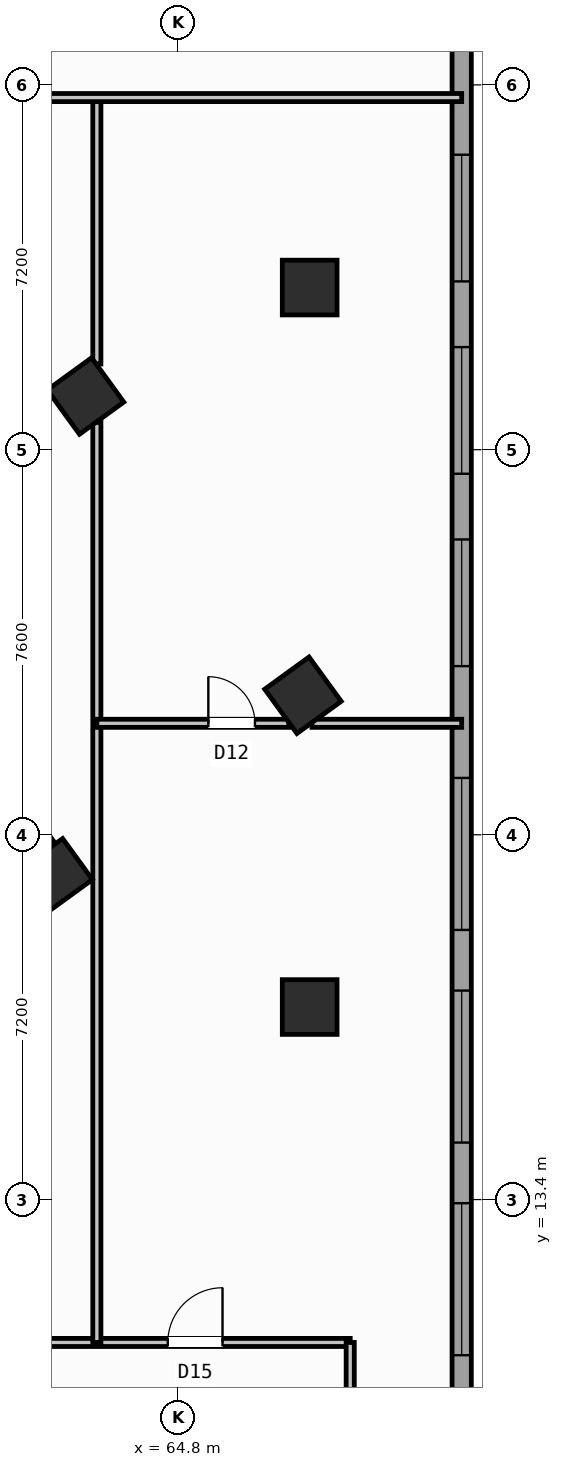
"""IFC4 building model, lengths in metres.
Left out: names, types, materials, properties, quantities, classifications, styles, units other than length and angle.
Written with IfcOpenShell. Run it as: python <this file> out.ifc"""

import sys

from ifc_helpers import new_model, si_unit, direction, frame, frame_2d, origin, origin_2d, place, context, subcontext, project, spatial, rectangle, hollow_rectangle, extrude, source, transform, mapped, element, fill, save


model = new_model("IFC4")
c1 = context("Model", 3, precision=1e-05, world=origin(), true_north=direction((0.0, 1.0)))
c2 = subcontext(c1, "Body", "Model", "MODEL_VIEW")
j1 = project(units=[si_unit("LENGTHUNIT", "METRE"), si_unit("PLANEANGLEUNIT", "RADIAN")], contexts=[c1])
p1 = place(None, origin())
s1 = spatial("IfcSite", under=j1, at=p1, CompositionType="ELEMENT")
p2 = place(p1, origin())
s2 = spatial("IfcBuilding", under=s1, at=p2, CompositionType="ELEMENT")
p3 = place(p2, frame((0.0, 0.0, 5.4)))
s3 = spatial("IfcBuildingStorey", under=s2, at=p3, CompositionType="ELEMENT", Elevation=5.4)
p4 = place(p3, frame((52.318, 13.11, 0.0), z_axis=(0.0, 0.0, 1.0), x_axis=(0.809019445368, 0.587781878776, 0.0)))
e1 = element("IfcWall", 1, at=p4, inside=s3, PredefinedType="SHEAR", context=c2, shape_type="SweptSolid", body=[
    extrude(rectangle(XDim=12.44, YDim=0.65, at=frame_2d((6.22, 0.0))), origin(), (0.0, 0.0, 1.0), 4.45),
])
m1 = source(origin(), c2, "Body", "SweptSolid", [
    extrude(hollow_rectangle(XDim=1.08, YDim=1.08, WallThickness=0.04, at=origin_2d()), origin(), (0.0, 0.0, 1.0), 4.8),
])
for number, where, z_axis, x_axis in (
    (2, (67.4, 17.2, 0.0), (0.0, 0.0, 1.0), (1.0, 0.0, 0.0)),
    (3, (67.4, 31.4, 0.0), (0.0, 0.0, 1.0), (1.0, 0.0, 0.0)),
    (4, (67.268, 23.354, 0.0), (0.0, 0.0, 1.0), (0.809, 0.588, 0.0)),
    (5, (62.977, 29.259, 0.0), (0.0, 0.0, 1.0), (0.809, 0.588, 0.0)),
):
    element("IfcColumn", number, at=place(p3, frame(where, z_axis=z_axis, x_axis=x_axis)), inside=s3, PredefinedType="COLUMN", context=c2, shape_type="MappedRepresentation", body=[
        mapped(m1, transform((0.0, 0.0, 0.0), scale=1.0)),
    ])
m2 = source(origin(), c2, "Body", "SweptSolid", [
    extrude(hollow_rectangle(XDim=1.0, YDim=1.0, WallThickness=0.04, at=origin_2d()), origin(), (0.0, 0.0, 1.0), 4.8),
])
p5 = place(p3, frame((62.414, 19.827, 0.0), z_axis=(0.0, 0.0, 1.0), x_axis=(0.809016994375, 0.587785252292, 0.0)))
e6 = element("IfcColumn", 6, at=p5, inside=s3, PredefinedType="COLUMN", context=c2, shape_type="MappedRepresentation", body=[
    mapped(m2, transform((0.0, 0.0, 0.0), scale=1.0)),
])
p6 = place(p3, frame((70.4, 43.117, 0.0), z_axis=(0.0, 0.0, 1.0), x_axis=(0.0, -1.0, 0.0)))
e7 = element("IfcWall", 7, at=p6, inside=s3, PredefinedType="STANDARD", context=c2, shape_type="SweptSolid", body=[
    extrude(rectangle(XDim=38.234, YDim=0.38, at=frame_2d((19.117, 0.0))), origin(), (0.0, 0.0, 1.0), 4.45),
])
p7 = place(p6, frame((2.569, 0.0, 0.7)))
e8 = element("IfcOpeningElement", 8, at=p7, cuts=e7, PredefinedType="OPENING", context=c2, shape_type="SweptSolid", body=[
    extrude(rectangle(XDim=3.0, YDim=2.3, at=frame_2d((1.5, 1.15))), frame((0.0, 0.2, 0.0), z_axis=(0.0, -1.0, 0.0), x_axis=(1.0, 0.0, 0.0)), (0.0, 0.0, 1.0), 0.4),
])
p8 = place(p6, frame((9.095, 0.0, 0.9)))
e9 = element("IfcOpeningElement", 9, at=p8, cuts=e7, PredefinedType="OPENING", context=c2, shape_type="SweptSolid", body=[
    extrude(rectangle(XDim=2.5, YDim=1.9, at=frame_2d((1.25, 0.95))), frame((0.0, 0.2, 0.0), z_axis=(0.0, -1.0, 0.0), x_axis=(1.0, 0.0, 0.0)), (0.0, 0.0, 1.0), 0.4),
])
p9 = place(p6, frame((12.892, 0.0, 0.9)))
e10 = element("IfcOpeningElement", 10, at=p9, cuts=e7, PredefinedType="OPENING", context=c2, shape_type="SweptSolid", body=[
    extrude(rectangle(XDim=2.5, YDim=1.9, at=frame_2d((1.25, 0.95))), frame((0.0, 0.2, 0.0), z_axis=(0.0, -1.0, 0.0), x_axis=(1.0, 0.0, 0.0)), (0.0, 0.0, 1.0), 0.4),
])
p10 = place(p6, frame((16.689, 0.0, 0.9)))
e11 = element("IfcOpeningElement", 11, at=p10, cuts=e7, PredefinedType="OPENING", context=c2, shape_type="SweptSolid", body=[
    extrude(rectangle(XDim=2.5, YDim=1.9, at=frame_2d((1.25, 0.95))), frame((0.0, 0.2, 0.0), z_axis=(0.0, -1.0, 0.0), x_axis=(1.0, 0.0, 0.0)), (0.0, 0.0, 1.0), 0.4),
])
p11 = place(p6, frame((21.396, 0.0, 0.7)))
e12 = element("IfcOpeningElement", 12, at=p11, cuts=e7, PredefinedType="OPENING", context=c2, shape_type="SweptSolid", body=[
    extrude(rectangle(XDim=3.0, YDim=2.3, at=frame_2d((1.5, 1.15))), frame((0.0, 0.2, 0.0), z_axis=(0.0, -1.0, 0.0), x_axis=(1.0, 0.0, 0.0)), (0.0, 0.0, 1.0), 0.4),
])
p12 = place(p6, frame((25.592, 0.0, 0.7)))
e13 = element("IfcOpeningElement", 13, at=p12, cuts=e7, PredefinedType="OPENING", context=c2, shape_type="SweptSolid", body=[
    extrude(rectangle(XDim=3.0, YDim=2.3, at=frame_2d((1.5, 1.15))), frame((0.0, 0.2, 0.0), z_axis=(0.0, -1.0, 0.0), x_axis=(1.0, 0.0, 0.0)), (0.0, 0.0, 1.0), 0.4),
])
p13 = place(p6, frame((29.789, 0.0, 0.7)))
e14 = element("IfcOpeningElement", 14, at=p13, cuts=e7, PredefinedType="OPENING", context=c2, shape_type="SweptSolid", body=[
    extrude(rectangle(XDim=3.0, YDim=2.3, at=frame_2d((1.5, 1.15))), frame((0.0, 0.2, 0.0), z_axis=(0.0, -1.0, 0.0), x_axis=(1.0, 0.0, 0.0)), (0.0, 0.0, 1.0), 0.4),
])
p14 = place(p6, frame((33.986, 0.0, 0.7)))
e15 = element("IfcOpeningElement", 15, at=p14, cuts=e7, PredefinedType="OPENING", context=c2, shape_type="SweptSolid", body=[
    extrude(rectangle(XDim=3.0, YDim=2.3, at=frame_2d((1.5, 1.15))), frame((0.0, 0.2, 0.0), z_axis=(0.0, -1.0, 0.0), x_axis=(1.0, 0.0, 0.0)), (0.0, 0.0, 1.0), 0.4),
])
p15 = place(p3, frame((6.1, 10.58, 0.0), z_axis=(0.0, 0.0, 1.0), x_axis=(1.0, 0.0, 0.0)))
e16 = element("IfcWall", 16, at=p15, inside=s3, PredefinedType="PARTITIONING", context=c2, shape_type="SweptSolid", body=[
    extrude(rectangle(XDim=62.1, YDim=0.16, at=frame_2d((31.05, 0.0))), origin(), (0.0, 0.0, 1.0), 4.44),
])
p16 = place(p15, frame((29.0, 0.0, 0.0)))
e17 = element("IfcOpeningElement", 17, at=p16, cuts=e16, PredefinedType="OPENING", context=c2, shape_type="SweptSolid", body=[
    extrude(rectangle(XDim=1.7, YDim=2.2, at=frame_2d((0.85, 1.1))), frame((0.0, 0.09, 0.0), z_axis=(0.0, -1.0, 0.0), x_axis=(1.0, 0.0, 0.0)), (0.0, 0.0, 1.0), 0.18),
])
p17 = place(p15, frame((0.35, 0.0, 0.0)))
e18 = element("IfcOpeningElement", 18, at=p17, cuts=e16, PredefinedType="OPENING", context=c2, shape_type="SweptSolid", body=[
    extrude(rectangle(XDim=1.5, YDim=2.15, at=frame_2d((0.75, 1.075))), frame((0.0, 0.09, 0.0), z_axis=(0.0, -1.0, 0.0), x_axis=(1.0, 0.0, 0.0)), (0.0, 0.0, 1.0), 0.18),
])
p18 = place(p15, frame((5.2, 0.0, 0.0)))
e19 = element("IfcOpeningElement", 19, at=p18, cuts=e16, PredefinedType="OPENING", context=c2, shape_type="SweptSolid", body=[
    extrude(rectangle(XDim=1.08, YDim=2.15, at=frame_2d((0.54, 1.075))), frame((0.0, 0.09, 0.0), z_axis=(0.0, -1.0, 0.0), x_axis=(1.0, 0.0, 0.0)), (0.0, 0.0, 1.0), 0.18),
])
p19 = place(p15, frame((58.5, 0.0, 0.0)))
e20 = element("IfcOpeningElement", 20, at=p19, cuts=e16, PredefinedType="OPENING", context=c2, shape_type="SweptSolid", body=[
    extrude(rectangle(XDim=1.08, YDim=2.15, at=frame_2d((0.54, 1.075))), frame((0.0, 0.09, 0.0), z_axis=(0.0, -1.0, 0.0), x_axis=(1.0, 0.0, 0.0)), (0.0, 0.0, 1.0), 0.18),
])
p20 = place(p3, frame((63.2, 10.58, 0.0), z_axis=(0.0, 0.0, 1.0), x_axis=(0.0, 1.0, 0.0)))
e21 = element("IfcWall", 21, at=p20, inside=s3, PredefinedType="PARTITIONING", context=c2, shape_type="SweptSolid", body=[
    extrude(rectangle(XDim=18.159, YDim=0.16, at=frame_2d((9.08, 0.0))), origin(), (0.0, 0.0, 1.0), 4.44),
])
p21 = place(p3, frame((63.2, 29.891, 0.0), z_axis=(0.0, 0.0, 1.0), x_axis=(0.0, 1.0, 0.0)))
e22 = element("IfcWall", 22, at=p21, inside=s3, PredefinedType="PARTITIONING", context=c2, shape_type="SweptSolid", body=[
    extrude(rectangle(XDim=5.259, YDim=0.16, at=frame_2d((2.629, 0.0))), origin(), (0.0, 0.0, 1.0), 4.44),
])
p22 = place(p3, frame((59.379, 35.15, 0.0), z_axis=(0.0, 0.0, 1.0), x_axis=(1.0, 0.0, 0.0)))
e23 = element("IfcWall", 23, at=p22, inside=s3, PredefinedType="PARTITIONING", context=c2, shape_type="SweptSolid", body=[
    extrude(rectangle(XDim=11.021, YDim=0.16, at=frame_2d((5.51, 0.0))), origin(), (0.0, 0.0, 1.0), 4.44),
])
p23 = place(p3, frame((68.2, 7.62, 0.0), z_axis=(0.0, 0.0, 1.0), x_axis=(0.0, 1.0, 0.0)))
e24 = element("IfcWall", 24, at=p23, inside=s3, PredefinedType="PARTITIONING", context=c2, shape_type="SweptSolid", body=[
    extrude(rectangle(XDim=2.96, YDim=0.16, at=frame_2d((1.48, 0.0))), origin(), (0.0, 0.0, 1.0), 4.44),
])
p24 = place(p3, frame((63.2, 22.8, 0.0), z_axis=(0.0, 0.0, 1.0), x_axis=(1.0, 0.0, 0.0)))
e25 = element("IfcWall", 25, at=p24, inside=s3, PredefinedType="PARTITIONING", context=c2, shape_type="SweptSolid", body=[
    extrude(rectangle(XDim=3.788, YDim=0.16, at=frame_2d((1.894, 0.0))), origin(), (0.0, 0.0, 1.0), 4.44),
])
p25 = place(p24, frame((2.2, 0.0, 0.0)))
e26 = element("IfcOpeningElement", 26, at=p25, cuts=e25, PredefinedType="OPENING", context=c2, shape_type="SweptSolid", body=[
    extrude(rectangle(XDim=0.92, YDim=2.08, at=frame_2d((0.46, 1.04))), frame((0.0, 0.09, 0.0), z_axis=(0.0, -1.0, 0.0), x_axis=(1.0, 0.0, 0.0)), (0.0, 0.0, 1.0), 0.18),
])
p26 = place(p3, frame((67.445, 22.8, 0.0), z_axis=(0.0, 0.0, 1.0), x_axis=(1.0, 0.0, 0.0)))
e27 = element("IfcWall", 27, at=p26, inside=s3, PredefinedType="PARTITIONING", context=c2, shape_type="SweptSolid", body=[
    extrude(rectangle(XDim=2.955, YDim=0.16, at=frame_2d((1.478, 0.0))), origin(), (0.0, 0.0, 1.0), 4.44),
])
m3 = source(origin(), c2, "Body", "SweptSolid", [
    extrude(rectangle(XDim=2.5, YDim=1.9, at=frame_2d((1.25, 0.95))), frame((0.0, 0.03, 0.0), z_axis=(0.0, -1.0, 0.0), x_axis=(1.0, 0.0, 0.0)), (0.0, 0.0, 1.0), 0.06),
])
p27 = place(p8, origin())
e28 = element("IfcWindow", 28, at=p27, inside=s3, PartitioningType="SINGLE_PANEL", PredefinedType="WINDOW", context=c2, shape_type="MappedRepresentation", body=[
    mapped(m3, transform((0.0, 0.0, 0.0), scale=1.0)),
])
fill(e9, e28)
p28 = place(p9, origin())
e29 = element("IfcWindow", 29, at=p28, inside=s3, PartitioningType="SINGLE_PANEL", PredefinedType="WINDOW", context=c2, shape_type="MappedRepresentation", body=[
    mapped(m3, transform((0.0, 0.0, 0.0), scale=1.0)),
])
fill(e10, e29)
p29 = place(p10, origin())
e30 = element("IfcWindow", 30, at=p29, inside=s3, PartitioningType="SINGLE_PANEL", PredefinedType="WINDOW", context=c2, shape_type="MappedRepresentation", body=[
    mapped(m3, transform((0.0, 0.0, 0.0), scale=1.0)),
])
fill(e11, e30)
m4 = source(origin(), c2, "Body", "SweptSolid", [
    extrude(rectangle(XDim=3.0, YDim=2.3, at=frame_2d((1.5, 1.15))), frame((0.0, 0.03, 0.0), z_axis=(0.0, -1.0, 0.0), x_axis=(1.0, 0.0, 0.0)), (0.0, 0.0, 1.0), 0.06),
])
p30 = place(p11, origin())
e31 = element("IfcWindow", 31, at=p30, inside=s3, PartitioningType="SINGLE_PANEL", PredefinedType="WINDOW", context=c2, shape_type="MappedRepresentation", body=[
    mapped(m4, transform((0.0, 0.0, 0.0), scale=1.0)),
])
fill(e12, e31)
p31 = place(p12, origin())
e32 = element("IfcWindow", 32, at=p31, inside=s3, PartitioningType="SINGLE_PANEL", PredefinedType="WINDOW", context=c2, shape_type="MappedRepresentation", body=[
    mapped(m4, transform((0.0, 0.0, 0.0), scale=1.0)),
])
fill(e13, e32)
p32 = place(p13, origin())
e33 = element("IfcWindow", 33, at=p32, inside=s3, PartitioningType="SINGLE_PANEL", PredefinedType="WINDOW", context=c2, shape_type="MappedRepresentation", body=[
    mapped(m4, transform((0.0, 0.0, 0.0), scale=1.0)),
])
fill(e14, e33)
m5 = source(origin(), c2, "Body", "SweptSolid", [
    extrude(rectangle(XDim=1.08, YDim=2.15, at=frame_2d((0.54, 1.075))), frame((0.0, 0.025, 0.0), z_axis=(0.0, -1.0, 0.0), x_axis=(1.0, 0.0, 0.0)), (0.0, 0.0, 1.0), 0.05),
])
p33 = place(p19, origin())
e34 = element("IfcDoor", 34, at=p33, inside=s3, OperationType="SINGLE_SWING_RIGHT", PredefinedType="DOOR", context=c2, shape_type="MappedRepresentation", body=[
    mapped(m5, transform((0.0, 0.0, 0.0), scale=1.0)),
])
fill(e20, e34)
m6 = source(origin(), c2, "Body", "SweptSolid", [
    extrude(rectangle(XDim=0.92, YDim=2.08, at=frame_2d((0.46, 1.04))), frame((0.0, 0.025, 0.0), z_axis=(0.0, -1.0, 0.0), x_axis=(1.0, 0.0, 0.0)), (0.0, 0.0, 1.0), 0.05),
])
p34 = place(p25, origin())
e35 = element("IfcDoor", 35, at=p34, inside=s3, OperationType="SINGLE_SWING_LEFT", PredefinedType="DOOR", context=c2, shape_type="MappedRepresentation", body=[
    mapped(m6, transform((0.0, 0.0, 0.0), scale=1.0)),
])
fill(e26, e35)
save(model, sys.argv[1])
